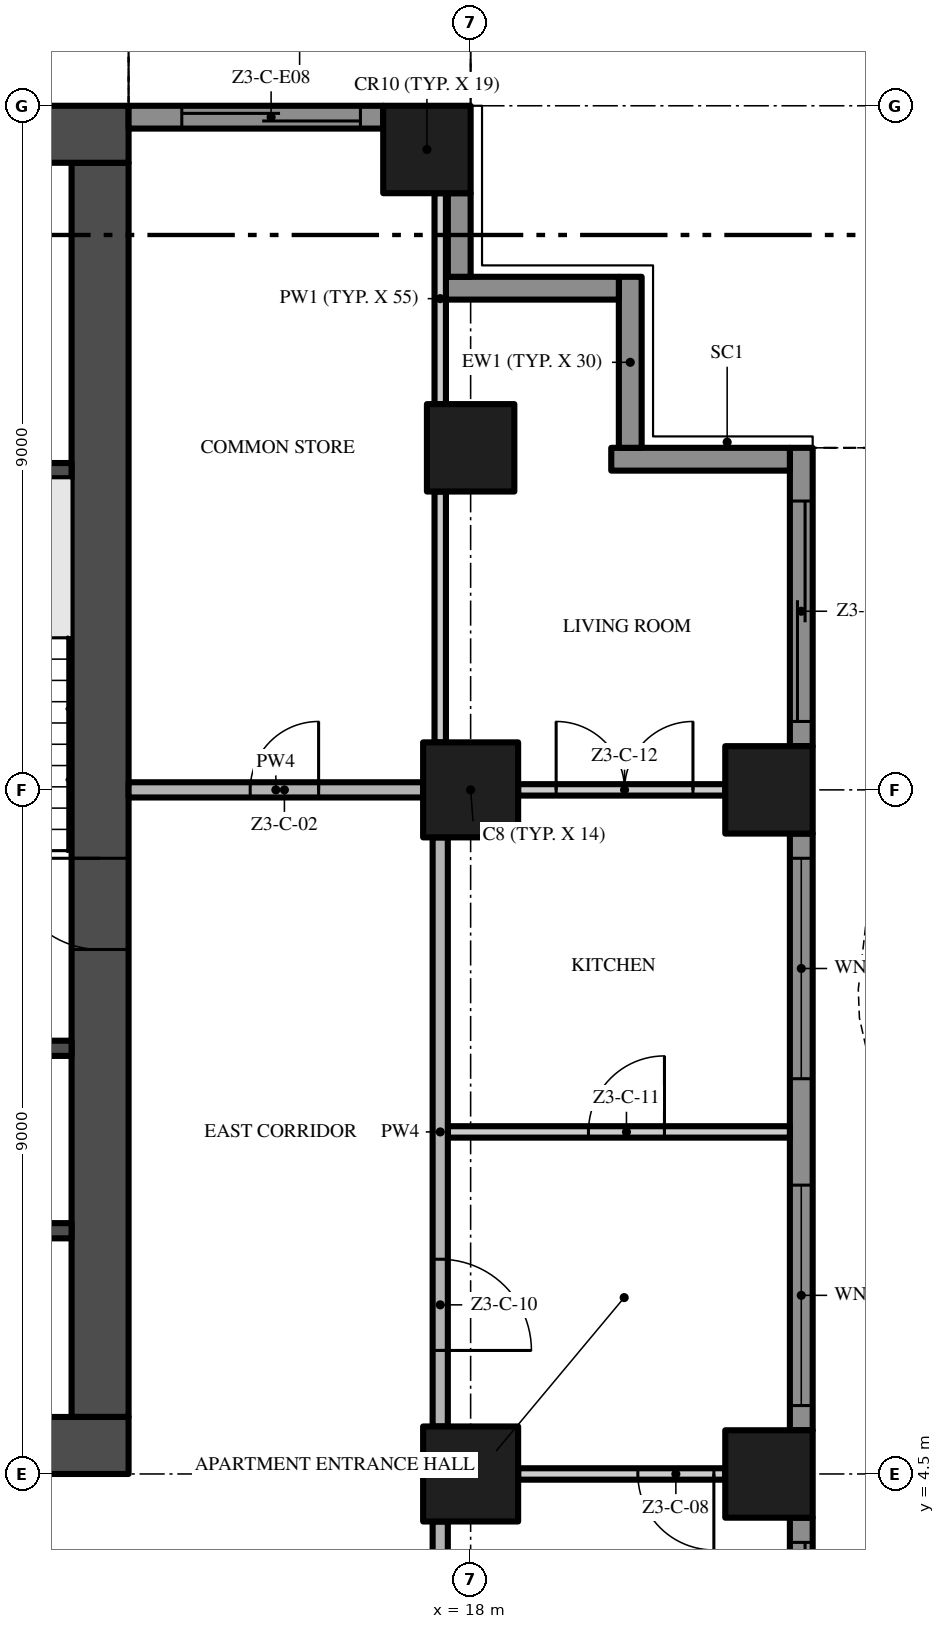
"""IFC4 building model, lengths in metres.
Left out: names, types, materials, properties, quantities, classifications, styles, units other than length and angle.
Written with IfcOpenShell. Run it as: python <this file> out.ifc"""

import sys

from ifc_helpers import new_model, si_unit, direction, frame, frame_2d, origin, origin_2d, place, context, subcontext, project, spatial, polyline, rectangle, outline, extrude, element, fill, save


model = new_model("IFC4")
c1 = context("Model", 3, precision=1e-05, world=origin(), true_north=direction((0.0, 1.0)))
c2 = subcontext(c1, "Body", "Model", "MODEL_VIEW")
j1 = project(units=[si_unit("LENGTHUNIT", "METRE"), si_unit("PLANEANGLEUNIT", "RADIAN")], contexts=[c1])
p1 = place(None, origin())
s1 = spatial("IfcSite", under=j1, at=p1, CompositionType="ELEMENT")
p2 = place(p1, origin())
s2 = spatial("IfcBuilding", under=s1, at=p2, CompositionType="ELEMENT")
p3 = place(p2, frame((0.0, 0.0, 147.8)))
s3 = spatial("IfcBuildingStorey", under=s2, at=p3, CompositionType="ELEMENT", Elevation=147.8)
p4 = place(p3, frame((-13.5, 4.875, -0.3), z_axis=(0.0, 0.0, 1.0), x_axis=(1.0, 0.0, 0.0)))
e1 = element("IfcWall", 1, at=p4, inside=s3, PredefinedType="SHEAR", context=c2, shape_type="SweptSolid", body=[
    extrude(rectangle(XDim=27.0, YDim=0.75, at=frame_2d((13.5, 0.0))), origin(), (0.0, 0.0, 1.0), 3.8),
])
p5 = place(p4, frame((12.0, 0.0, 0.3)))
e2 = element("IfcOpeningElement", 2, at=p5, cuts=e1, PredefinedType="OPENING", context=c2, shape_type="SweptSolid", body=[
    extrude(rectangle(XDim=3.0, YDim=2.4, at=frame_2d((1.5, 1.2))), frame((0.0, 0.385, 0.0), z_axis=(0.0, -1.0, 0.0), x_axis=(1.0, 0.0, 0.0)), (0.0, 0.0, 1.0), 0.77),
])
p6 = place(p4, frame((4.9, 0.0, 0.3)))
e3 = element("IfcOpeningElement", 3, at=p6, cuts=e1, PredefinedType="OPENING", context=c2, shape_type="SweptSolid", body=[
    extrude(rectangle(XDim=1.2, YDim=2.2, at=frame_2d((0.6, 1.1))), frame((0.0, 0.385, 0.0), z_axis=(0.0, -1.0, 0.0), x_axis=(1.0, 0.0, 0.0)), (0.0, 0.0, 1.0), 0.77),
])
p7 = place(p4, frame((20.75, 0.0, 0.3)))
e4 = element("IfcOpeningElement", 4, at=p7, cuts=e1, PredefinedType="OPENING", context=c2, shape_type="SweptSolid", body=[
    extrude(rectangle(XDim=1.5, YDim=2.2, at=frame_2d((0.75, 1.1))), frame((0.0, 0.385, 0.0), z_axis=(0.0, -1.0, 0.0), x_axis=(1.0, 0.0, 0.0)), (0.0, 0.0, 1.0), 0.77),
])
p8 = place(p4, frame((17.4, 0.0, 0.3)))
e5 = element("IfcOpeningElement", 5, at=p8, cuts=e1, PredefinedType="OPENING", context=c2, shape_type="SweptSolid", body=[
    extrude(rectangle(XDim=1.2, YDim=2.2, at=frame_2d((0.6, 1.1))), frame((0.0, 0.385, 0.0), z_axis=(0.0, -1.0, 0.0), x_axis=(1.0, 0.0, 0.0)), (0.0, 0.0, 1.0), 0.77),
])
p9 = place(p3, frame((13.125, 5.25, -0.3), z_axis=(0.0, 0.0, 1.0), x_axis=(0.0, 1.0, 0.0)))
e6 = element("IfcWall", 6, at=p9, inside=s3, PredefinedType="SHEAR", context=c2, shape_type="SweptSolid", body=[
    extrude(rectangle(XDim=16.5, YDim=0.75, at=frame_2d((8.25, 0.0))), origin(), (0.0, 0.0, 1.0), 3.8),
])
p10 = place(p9, frame((6.15, 0.0, 0.3)))
e7 = element("IfcOpeningElement", 7, at=p10, cuts=e6, PredefinedType="OPENING", context=c2, shape_type="SweptSolid", body=[
    extrude(rectangle(XDim=1.2, YDim=2.2, at=frame_2d((0.6, 1.1))), frame((0.0, 0.385, 0.0), z_axis=(0.0, -1.0, 0.0), x_axis=(1.0, 0.0, 0.0)), (0.0, 0.0, 1.0), 0.77),
])
p11 = place(p3, frame((13.5, 22.125, -0.3), z_axis=(0.0, 0.0, 1.0), x_axis=(-1.0, 0.0, 0.0)))
e8 = element("IfcWall", 8, at=p11, inside=s3, PredefinedType="SHEAR", context=c2, shape_type="SweptSolid", body=[
    extrude(rectangle(XDim=27.0, YDim=0.75, at=frame_2d((13.5, 0.0))), origin(), (0.0, 0.0, 1.0), 3.8),
])
p12 = place(p3, frame((18.0, 13.5, 0.0), z_axis=(0.0, 0.0, 1.0), x_axis=(1.0, 0.0, 0.0)))
e9 = element("IfcColumn", 9, at=p12, inside=s3, PredefinedType="COLUMN", context=c2, shape_type="SweptSolid", body=[
    extrude(rectangle(XDim=1.25, YDim=1.25, at=origin_2d()), origin(), (0.0, 0.0, 1.0), 3.5),
])
p13 = place(p3, frame((17.425, 21.925, 0.0), z_axis=(0.0, 0.0, 1.0), x_axis=(1.0, 0.0, 0.0)))
e10 = element("IfcColumn", 10, at=p13, inside=s3, PredefinedType="COLUMN", context=c2, shape_type="SweptSolid", body=[
    extrude(rectangle(XDim=1.15, YDim=1.15, at=origin_2d()), origin(), (0.0, 0.0, 1.0), 3.5),
])
p14 = place(p3, frame((18.0, 4.5, 0.0), z_axis=(0.0, 0.0, 1.0), x_axis=(1.0, 0.0, 0.0)))
e11 = element("IfcColumn", 11, at=p14, inside=s3, PredefinedType="COLUMN", context=c2, shape_type="SweptSolid", body=[
    extrude(rectangle(XDim=1.25, YDim=1.25, at=origin_2d()), origin(), (0.0, 0.0, 1.0), 3.5),
])
for number, where, z_axis, x_axis in (
    (12, (21.925, 13.5, 0.0), (0.0, 0.0, 1.0), (1.0, 0.0, 0.0)),
    (13, (18.0, 18.0, 0.0), (0.0, 0.0, 1.0), (1.0, 0.0, 0.0)),
    (14, (21.925, 4.5, 0.0), (0.0, 0.0, 1.0), (1.0, 0.0, 0.0)),
):
    element("IfcColumn", number, at=place(p3, frame(where, z_axis=z_axis, x_axis=x_axis)), inside=s3, PredefinedType="COLUMN", context=c2, shape_type="SweptSolid", body=[
        extrude(rectangle(XDim=1.15, YDim=1.15, at=origin_2d()), origin(), (0.0, 0.0, 1.0), 3.5),
    ])
p15 = place(p3, frame((22.35, 3.925, 0.0), z_axis=(0.0, 0.0, 1.0), x_axis=(0.0, -1.0, 0.0)))
e15 = element("IfcWall", 15, at=p15, inside=s3, PredefinedType="SOLIDWALL", context=c2, shape_type="SweptSolid", body=[
    extrude(rectangle(XDim=7.85, YDim=0.3, at=frame_2d((3.925, 0.0))), origin(), (0.0, 0.0, 1.0), 3.5),
])
p16 = place(p15, frame((4.625, 0.0, 0.45)))
e16 = element("IfcOpeningElement", 16, at=p16, cuts=e15, PredefinedType="OPENING", context=c2, shape_type="SweptSolid", body=[
    extrude(rectangle(XDim=2.9, YDim=2.65, at=frame_2d((1.45, 1.325))), frame((0.0, 0.16, 0.0), z_axis=(0.0, -1.0, 0.0), x_axis=(1.0, 0.0, 0.0)), (0.0, 0.0, 1.0), 0.32),
])
p17 = place(p15, frame((0.325, 0.0, 0.0)))
e17 = element("IfcOpeningElement", 17, at=p17, cuts=e15, PredefinedType="OPENING", context=c2, shape_type="SweptSolid", body=[
    extrude(rectangle(XDim=2.9, YDim=2.4, at=frame_2d((1.45, 1.2))), frame((0.0, 0.16, 0.0), z_axis=(0.0, -1.0, 0.0), x_axis=(1.0, 0.0, 0.0)), (0.0, 0.0, 1.0), 0.32),
])
p18 = place(p3, frame((22.35, 12.925, 0.0), z_axis=(0.0, 0.0, 1.0), x_axis=(0.0, -1.0, 0.0)))
e18 = element("IfcWall", 18, at=p18, inside=s3, PredefinedType="SOLIDWALL", context=c2, shape_type="SweptSolid", body=[
    extrude(rectangle(XDim=7.85, YDim=0.3, at=frame_2d((3.925, 0.0))), origin(), (0.0, 0.0, 1.0), 3.5),
])
p19 = place(p18, frame((4.625, 0.0, 0.45)))
e19 = element("IfcOpeningElement", 19, at=p19, cuts=e18, PredefinedType="OPENING", context=c2, shape_type="SweptSolid", body=[
    extrude(rectangle(XDim=2.9, YDim=2.65, at=frame_2d((1.45, 1.325))), frame((0.0, 0.16, 0.0), z_axis=(0.0, -1.0, 0.0), x_axis=(1.0, 0.0, 0.0)), (0.0, 0.0, 1.0), 0.32),
])
p20 = place(p18, frame((0.325, 0.0, 0.45)))
e20 = element("IfcOpeningElement", 20, at=p20, cuts=e18, PredefinedType="OPENING", context=c2, shape_type="SweptSolid", body=[
    extrude(rectangle(XDim=2.9, YDim=2.65, at=frame_2d((1.45, 1.325))), frame((0.0, 0.16, 0.0), z_axis=(0.0, -1.0, 0.0), x_axis=(1.0, 0.0, 0.0)), (0.0, 0.0, 1.0), 0.32),
])
p21 = place(p3, frame((22.35, 18.0, 0.0), z_axis=(0.0, 0.0, 1.0), x_axis=(0.0, -1.0, 0.0)))
e21 = element("IfcWall", 21, at=p21, inside=s3, PredefinedType="SOLIDWALL", context=c2, shape_type="SweptSolid", body=[
    extrude(rectangle(XDim=3.925, YDim=0.3, at=frame_2d((1.962, 0.0))), origin(), (0.0, 0.0, 1.0), 3.5),
])
p22 = place(p21, frame((0.7, 0.0, 0.0)))
e22 = element("IfcOpeningElement", 22, at=p22, cuts=e21, PredefinedType="OPENING", context=c2, shape_type="SweptSolid", body=[
    extrude(rectangle(XDim=2.9, YDim=2.4, at=frame_2d((1.45, 1.2))), frame((0.0, 0.16, 0.0), z_axis=(0.0, -1.0, 0.0), x_axis=(1.0, 0.0, 0.0)), (0.0, 0.0, 1.0), 0.32),
])
p23 = place(p3, frame((19.85, 17.85, 0.0), z_axis=(0.0, 0.0, 1.0), x_axis=(1.0, 0.0, 0.0)))
e23 = element("IfcWall", 23, at=p23, inside=s3, PredefinedType="SOLIDWALL", context=c2, shape_type="SweptSolid", body=[
    extrude(rectangle(XDim=2.35, YDim=0.3, at=frame_2d((1.175, 0.0))), origin(), (0.0, 0.0, 1.0), 3.5),
])
p24 = place(p3, frame((20.1, 20.25, 0.0), z_axis=(0.0, 0.0, 1.0), x_axis=(0.0, -1.0, 0.0)))
e24 = element("IfcWall", 24, at=p24, inside=s3, PredefinedType="SOLIDWALL", context=c2, shape_type="SweptSolid", body=[
    extrude(rectangle(XDim=2.25, YDim=0.3, at=frame_2d((1.125, 0.0))), origin(), (0.0, 0.0, 1.0), 3.5),
])
p25 = place(p3, frame((17.6, 20.1, 0.0), z_axis=(0.0, 0.0, 1.0), x_axis=(1.0, 0.0, 0.0)))
e25 = element("IfcWall", 25, at=p25, inside=s3, PredefinedType="SOLIDWALL", context=c2, shape_type="SweptSolid", body=[
    extrude(rectangle(XDim=2.35, YDim=0.3, at=frame_2d((1.175, 0.0))), origin(), (0.0, 0.0, 1.0), 3.5),
])
p26 = place(p3, frame((17.85, 21.35, 0.0), z_axis=(0.0, 0.0, 1.0), x_axis=(0.0, -1.0, 0.0)))
e26 = element("IfcWall", 26, at=p26, inside=s3, PredefinedType="SOLIDWALL", context=c2, shape_type="SweptSolid", body=[
    extrude(rectangle(XDim=1.1, YDim=0.3, at=frame_2d((0.55, 0.0))), origin(), (0.0, 0.0, 1.0), 3.5),
])
p27 = place(p3, frame((13.5, 22.35, 0.0), z_axis=(0.0, 0.0, 1.0), x_axis=(1.0, 0.0, 0.0)))
e27 = element("IfcWall", 27, at=p27, inside=s3, PredefinedType="SOLIDWALL", context=c2, shape_type="SweptSolid", body=[
    extrude(rectangle(XDim=3.35, YDim=0.3, at=frame_2d((1.675, 0.0))), origin(), (0.0, 0.0, 1.0), 3.5),
])
p28 = place(p27, frame((0.7, 0.0, 0.0)))
e28 = element("IfcOpeningElement", 28, at=p28, cuts=e27, PredefinedType="OPENING", context=c2, shape_type="SweptSolid", body=[
    extrude(rectangle(XDim=2.35, YDim=2.4, at=frame_2d((1.175, 1.2))), frame((0.0, 0.16, 0.0), z_axis=(0.0, -1.0, 0.0), x_axis=(1.0, 0.0, 0.0)), (0.0, 0.0, 1.0), 0.32),
])
p29 = place(p3, origin())
e29 = element("IfcWall", 29, at=p29, inside=s3, PredefinedType="USERDEFINED", context=c2, shape_type="SweptSolid", body=[
    extrude(outline(polyline([(25.149, -13.5), (25.485, -12.0), (25.5, -11.625), (25.369, -10.5), (24.845, -9.0), (24.112, -7.5), (23.451, -6.0), (23.115, -4.5), (23.1, -4.125), (23.231, -3.0), (23.755, -1.5), (24.488, 0.0), (25.149, 1.5), (25.485, 3.0), (25.5, 3.375), (25.369, 4.5), (24.845, 6.0), (24.112, 7.5), (23.451, 9.0), (23.115, 10.5), (23.1, 10.875), (23.231, 12.0), (23.755, 13.5), (24.488, 15.0), (25.149, 16.5), (25.485, 18.0), (25.241, 18.055), (24.91, 16.579), (24.261, 15.105), (23.524, 13.596), (22.986, 12.056), (22.849, 10.885), (22.866, 10.467), (23.213, 8.921), (23.885, 7.395), (24.614, 5.904), (25.124, 4.444), (25.249, 3.365), (25.236, 3.033), (24.91, 1.579), (24.261, 0.105), (23.524, -1.404), (22.986, -2.944), (22.849, -4.115), (22.866, -4.533), (23.213, -6.079), (23.885, -7.605), (24.614, -9.096), (25.124, -10.556), (25.249, -11.635), (25.236, -11.967), (24.905, -13.445), (25.149, -13.5)])), origin(), (0.0, 0.0, 1.0), 0.9),
])
for number, where, z_axis, x_axis in (
    (30, (9.65, 7.7, 0.0), (0.0, 0.0, 1.0), (1.0, 0.0, 0.0)),
    (31, (9.65, 10.1, 0.0), (0.0, 0.0, 1.0), (1.0, 0.0, 0.0)),
    (32, (9.65, 17.7, 0.0), (0.0, 0.0, 1.0), (1.0, 0.0, 0.0)),
):
    element("IfcWall", number, at=place(p3, frame(where, z_axis=z_axis, x_axis=x_axis)), inside=s3, PredefinedType="SHEAR", context=c2, shape_type="SweptSolid", body=[
        extrude(rectangle(XDim=3.1, YDim=0.2, at=frame_2d((1.55, 0.0))), origin(), (0.0, 0.0, 1.0), 3.5),
    ])
p30 = place(p3, frame((21.35, 4.5, 0.0), z_axis=(0.0, 0.0, 1.0), x_axis=(-1.0, 0.0, 0.0)))
e33 = element("IfcWall", 33, at=p30, inside=s3, PredefinedType="PARTITIONING", context=c2, shape_type="SweptSolid", body=[
    extrude(rectangle(XDim=2.725, YDim=0.15, at=frame_2d((1.363, 0.0))), origin(), (0.0, 0.0, 1.0), 3.5),
])
p31 = place(p30, frame((0.15, 0.0, 0.0)))
e34 = element("IfcOpeningElement", 34, at=p31, cuts=e33, PredefinedType="OPENING", context=c2, shape_type="SweptSolid", body=[
    extrude(rectangle(XDim=1.0, YDim=2.4, at=frame_2d((0.5, 1.2))), frame((0.0, 0.085, 0.0), z_axis=(0.0, -1.0, 0.0), x_axis=(1.0, 0.0, 0.0)), (0.0, 0.0, 1.0), 0.17),
])
p32 = place(p3, frame((17.7, 9.0, 0.0), z_axis=(0.0, 0.0, 1.0), x_axis=(1.0, 0.0, 0.0)))
e35 = element("IfcWall", 35, at=p32, inside=s3, PredefinedType="PARTITIONING", context=c2, shape_type="SweptSolid", body=[
    extrude(rectangle(XDim=4.5, YDim=0.15, at=frame_2d((2.25, 0.0))), origin(), (0.0, 0.0, 1.0), 3.5),
])
p33 = place(p32, frame((1.85, 0.0, 0.0)))
e36 = element("IfcOpeningElement", 36, at=p33, cuts=e35, PredefinedType="OPENING", context=c2, shape_type="SweptSolid", body=[
    extrude(rectangle(XDim=1.0, YDim=2.4, at=frame_2d((0.5, 1.2))), frame((0.0, 0.085, 0.0), z_axis=(0.0, -1.0, 0.0), x_axis=(1.0, 0.0, 0.0)), (0.0, 0.0, 1.0), 0.17),
])
p34 = place(p3, frame((13.5, 13.5, 0.0), z_axis=(0.0, 0.0, 1.0), x_axis=(1.0, 0.0, 0.0)))
e37 = element("IfcWall", 37, at=p34, inside=s3, PredefinedType="PARTITIONING", context=c2, shape_type="SweptSolid", body=[
    extrude(rectangle(XDim=3.875, YDim=0.2, at=frame_2d((1.938, 0.0))), origin(), (0.0, 0.0, 1.0), 3.5),
])
p35 = place(p34, frame((1.6, 0.0, 0.0)))
e38 = element("IfcOpeningElement", 38, at=p35, cuts=e37, PredefinedType="OPENING", context=c2, shape_type="SweptSolid", body=[
    extrude(rectangle(XDim=0.9, YDim=2.1, at=frame_2d((0.45, 1.05))), frame((0.0, 0.11, 0.0), z_axis=(0.0, -1.0, 0.0), x_axis=(1.0, 0.0, 0.0)), (0.0, 0.0, 1.0), 0.22),
])
p36 = place(p3, frame((18.625, 13.5, 0.0), z_axis=(0.0, 0.0, 1.0), x_axis=(1.0, 0.0, 0.0)))
e39 = element("IfcWall", 39, at=p36, inside=s3, PredefinedType="PARTITIONING", context=c2, shape_type="SweptSolid", body=[
    extrude(rectangle(XDim=2.725, YDim=0.15, at=frame_2d((1.363, 0.0))), origin(), (0.0, 0.0, 1.0), 3.5),
])
p37 = place(p36, frame((0.5, 0.0, 0.0)))
e40 = element("IfcOpeningElement", 40, at=p37, cuts=e39, PredefinedType="OPENING", context=c2, shape_type="SweptSolid", body=[
    extrude(rectangle(XDim=1.8, YDim=2.4, at=frame_2d((0.9, 1.2))), frame((0.0, 0.085, 0.0), z_axis=(0.0, -1.0, 0.0), x_axis=(1.0, 0.0, 0.0)), (0.0, 0.0, 1.0), 0.17),
])
p38 = place(p3, frame((17.6, -0.2, 0.0), z_axis=(0.0, 0.0, 1.0), x_axis=(0.0, 1.0, 0.0)))
e41 = element("IfcWall", 41, at=p38, inside=s3, PredefinedType="PARTITIONING", context=c2, shape_type="SweptSolid", body=[
    extrude(rectangle(XDim=4.075, YDim=0.2, at=frame_2d((2.038, 0.0))), origin(), (0.0, 0.0, 1.0), 3.5),
])
p39 = place(p3, frame((17.6, 12.875, 0.0), z_axis=(0.0, 0.0, 1.0), x_axis=(0.0, -1.0, 0.0)))
e42 = element("IfcWall", 42, at=p39, inside=s3, PredefinedType="PARTITIONING", context=c2, shape_type="SweptSolid", body=[
    extrude(rectangle(XDim=7.75, YDim=0.2, at=frame_2d((3.875, 0.0))), origin(), (0.0, 0.0, 1.0), 3.5),
])
p40 = place(p39, frame((5.55, 0.0, 0.0)))
e43 = element("IfcOpeningElement", 43, at=p40, cuts=e42, PredefinedType="OPENING", context=c2, shape_type="SweptSolid", body=[
    extrude(rectangle(XDim=1.2, YDim=2.4, at=frame_2d((0.6, 1.2))), frame((0.0, 0.11, 0.0), z_axis=(0.0, -1.0, 0.0), x_axis=(1.0, 0.0, 0.0)), (0.0, 0.0, 1.0), 0.22),
])
p41 = place(p3, frame((17.6, 14.125, 0.0), z_axis=(0.0, 0.0, 1.0), x_axis=(0.0, 1.0, 0.0)))
e44 = element("IfcWall", 44, at=p41, inside=s3, PredefinedType="PARTITIONING", context=c2, shape_type="SweptSolid", body=[
    extrude(rectangle(XDim=3.3, YDim=0.15, at=frame_2d((1.65, 0.0))), origin(), (0.0, 0.0, 1.0), 3.5),
])
p42 = place(p3, frame((17.6, 18.575, 0.0), z_axis=(0.0, 0.0, 1.0), x_axis=(0.0, 1.0, 0.0)))
e45 = element("IfcWall", 45, at=p42, inside=s3, PredefinedType="PARTITIONING", context=c2, shape_type="SweptSolid", body=[
    extrude(rectangle(XDim=2.775, YDim=0.15, at=frame_2d((1.387, 0.0))), origin(), (0.0, 0.0, 1.0), 3.5),
])
p43 = place(p17, origin())
e46 = element("IfcDoor", 46, at=p43, inside=s3, OperationType="SINGLE_SWING_LEFT", PredefinedType="DOOR", context=c2, shape_type="SweptSolid", body=[
    extrude(rectangle(XDim=2.9, YDim=2.4, at=frame_2d((1.45, 1.2))), frame((0.0, 0.025, 0.0), z_axis=(0.0, -1.0, 0.0), x_axis=(1.0, 0.0, 0.0)), (0.0, 0.0, 1.0), 0.05),
])
fill(e17, e46)
p44 = place(p19, origin())
e47 = element("IfcWindow", 47, at=p44, inside=s3, PartitioningType="SINGLE_PANEL", PredefinedType="WINDOW", context=c2, shape_type="SweptSolid", body=[
    extrude(rectangle(XDim=2.9, YDim=2.65, at=frame_2d((1.45, 1.325))), frame((0.0, 0.03, 0.0), z_axis=(0.0, -1.0, 0.0), x_axis=(1.0, 0.0, 0.0)), (0.0, 0.0, 1.0), 0.06),
])
fill(e19, e47)
p45 = place(p20, origin())
e48 = element("IfcWindow", 48, at=p45, inside=s3, PartitioningType="SINGLE_PANEL", PredefinedType="WINDOW", context=c2, shape_type="SweptSolid", body=[
    extrude(rectangle(XDim=2.9, YDim=2.65, at=frame_2d((1.45, 1.325))), frame((0.0, 0.03, 0.0), z_axis=(0.0, -1.0, 0.0), x_axis=(1.0, 0.0, 0.0)), (0.0, 0.0, 1.0), 0.06),
])
fill(e20, e48)
p46 = place(p22, origin())
e49 = element("IfcDoor", 49, at=p46, inside=s3, OperationType="SINGLE_SWING_LEFT", PredefinedType="DOOR", context=c2, shape_type="SweptSolid", body=[
    extrude(rectangle(XDim=2.9, YDim=2.4, at=frame_2d((1.45, 1.2))), frame((0.0, 0.025, 0.0), z_axis=(0.0, -1.0, 0.0), x_axis=(1.0, 0.0, 0.0)), (0.0, 0.0, 1.0), 0.05),
])
fill(e22, e49)
p47 = place(p28, origin())
e50 = element("IfcDoor", 50, at=p47, inside=s3, OperationType="SINGLE_SWING_LEFT", PredefinedType="DOOR", context=c2, shape_type="SweptSolid", body=[
    extrude(rectangle(XDim=2.35, YDim=2.4, at=frame_2d((1.175, 1.2))), frame((0.0, 0.025, 0.0), z_axis=(0.0, -1.0, 0.0), x_axis=(1.0, 0.0, 0.0)), (0.0, 0.0, 1.0), 0.05),
])
fill(e28, e50)
p48 = place(p10, frame((1.2, 0.0, 0.0), z_axis=(0.0, 0.0, 1.0), x_axis=(-1.0, 0.0, 0.0)))
e51 = element("IfcDoor", 51, at=p48, inside=s3, OperationType="SINGLE_SWING_LEFT", PredefinedType="DOOR", context=c2, shape_type="SweptSolid", body=[
    extrude(rectangle(XDim=1.2, YDim=2.2, at=frame_2d((0.6, 1.1))), frame((0.0, 0.025, 0.0), z_axis=(0.0, -1.0, 0.0), x_axis=(1.0, 0.0, 0.0)), (0.0, 0.0, 1.0), 0.05),
])
fill(e7, e51)
p49 = place(p35, origin())
e52 = element("IfcDoor", 52, at=p49, inside=s3, OperationType="SINGLE_SWING_RIGHT", PredefinedType="DOOR", context=c2, shape_type="SweptSolid", body=[
    extrude(rectangle(XDim=0.9, YDim=2.1, at=frame_2d((0.45, 1.05))), frame((0.0, 0.025, 0.0), z_axis=(0.0, -1.0, 0.0), x_axis=(1.0, 0.0, 0.0)), (0.0, 0.0, 1.0), 0.05),
])
fill(e38, e52)
p50 = place(p31, origin())
e53 = element("IfcDoor", 53, at=p50, inside=s3, OperationType="SINGLE_SWING_LEFT", PredefinedType="DOOR", context=c2, shape_type="SweptSolid", body=[
    extrude(rectangle(XDim=1.0, YDim=2.4, at=frame_2d((0.5, 1.2))), frame((0.0, 0.025, 0.0), z_axis=(0.0, -1.0, 0.0), x_axis=(1.0, 0.0, 0.0)), (0.0, 0.0, 1.0), 0.05),
])
fill(e34, e53)
p51 = place(p40, origin())
e54 = element("IfcDoor", 54, at=p51, inside=s3, OperationType="SINGLE_SWING_RIGHT", PredefinedType="DOOR", context=c2, shape_type="SweptSolid", body=[
    extrude(rectangle(XDim=1.2, YDim=2.4, at=frame_2d((0.6, 1.2))), frame((0.0, 0.025, 0.0), z_axis=(0.0, -1.0, 0.0), x_axis=(1.0, 0.0, 0.0)), (0.0, 0.0, 1.0), 0.05),
])
fill(e43, e54)
p52 = place(p33, origin())
e55 = element("IfcDoor", 55, at=p52, inside=s3, OperationType="SINGLE_SWING_RIGHT", PredefinedType="DOOR", context=c2, shape_type="SweptSolid", body=[
    extrude(rectangle(XDim=1.0, YDim=2.4, at=frame_2d((0.5, 1.2))), frame((0.0, 0.025, 0.0), z_axis=(0.0, -1.0, 0.0), x_axis=(1.0, 0.0, 0.0)), (0.0, 0.0, 1.0), 0.05),
])
fill(e36, e55)
p53 = place(p37, origin())
e56 = element("IfcDoor", 56, at=p53, inside=s3, OperationType="DOUBLE_DOOR_SINGLE_SWING", PredefinedType="DOOR", context=c2, shape_type="SweptSolid", body=[
    extrude(rectangle(XDim=1.8, YDim=2.4, at=frame_2d((0.9, 1.2))), frame((0.0, 0.025, 0.0), z_axis=(0.0, -1.0, 0.0), x_axis=(1.0, 0.0, 0.0)), (0.0, 0.0, 1.0), 0.05),
])
fill(e40, e56)
save(model, sys.argv[1])
